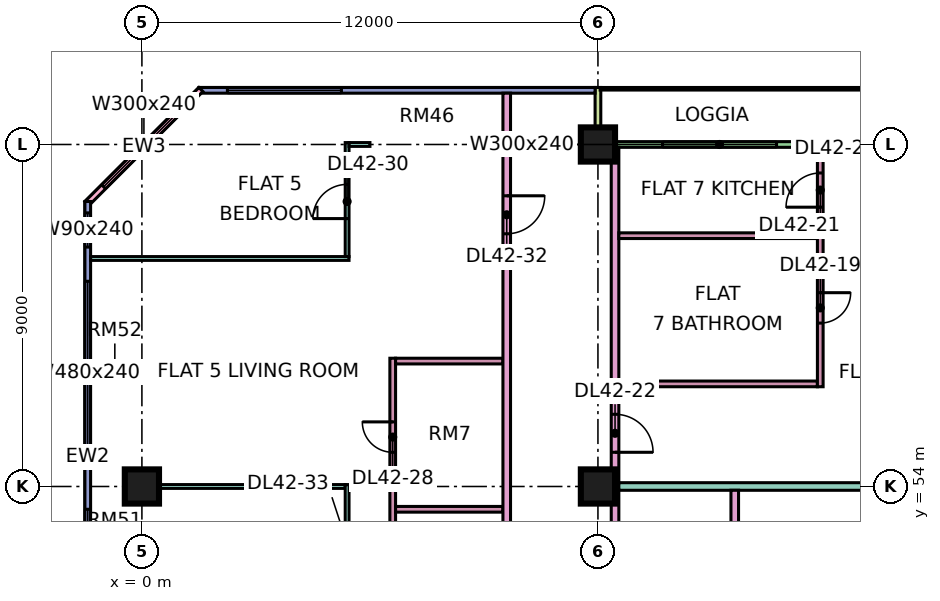
"""IFC4 building model, lengths in metres.
Left out: names, types, materials, properties, quantities, classifications, styles, units other than length and angle.
Written with IfcOpenShell. Run it as: python <this file> out.ifc"""

import sys

from ifc_helpers import new_model, si_unit, direction, frame, frame_2d, origin, origin_2d, place, context, subcontext, project, spatial, rectangle, extrude, element, fill, save


model = new_model("IFC4")
c1 = context("Model", 3, precision=1e-05, world=origin(), true_north=direction((0.0, 1.0)))
c2 = subcontext(c1, "Body", "Model", "MODEL_VIEW")
j1 = project(units=[si_unit("LENGTHUNIT", "METRE"), si_unit("PLANEANGLEUNIT", "RADIAN")], contexts=[c1])
p1 = place(None, origin())
s1 = spatial("IfcSite", under=j1, at=p1, CompositionType="ELEMENT")
p2 = place(p1, origin())
s2 = spatial("IfcBuilding", under=s1, at=p2, CompositionType="ELEMENT")
p3 = place(p2, frame((0.0, 0.0, 183.65)))
s3 = spatial("IfcBuildingStorey", under=s2, at=p3, CompositionType="ELEMENT", Elevation=183.65)
p4 = place(p3, frame((0.0, 54.0, 0.0), z_axis=(0.0, 0.0, 1.0), x_axis=(1.0, 0.0, 0.0)))
e1 = element("IfcColumn", 1, at=p4, inside=s3, PredefinedType="COLUMN", context=c2, shape_type="SweptSolid", body=[
    extrude(rectangle(XDim=0.9, YDim=0.9, at=origin_2d()), origin(), (0.0, 0.0, 1.0), 3.75),
])
for number, where, z_axis, x_axis in (
    (2, (12.0, 54.0, 0.0), (0.0, 0.0, 1.0), (1.0, 0.0, 0.0)),
    (3, (12.0, 63.0, 0.0), (0.0, 0.0, 1.0), (1.0, 0.0, 0.0)),
):
    element("IfcColumn", number, at=place(p3, frame(where, z_axis=z_axis, x_axis=x_axis)), inside=s3, PredefinedType="COLUMN", context=c2, shape_type="SweptSolid", body=[
        extrude(rectangle(XDim=0.9, YDim=0.9, at=origin_2d()), origin(), (0.0, 0.0, 1.0), 3.75),
    ])
p5 = place(p3, frame((22.425, 63.0, 0.0), z_axis=(0.0, 0.0, 1.0), x_axis=(-1.0, 0.0, 0.0)))
e4 = element("IfcWall", 4, at=p5, inside=s3, PredefinedType="SOLIDWALL", context=c2, shape_type="SweptSolid", body=[
    extrude(rectangle(XDim=10.35, YDim=0.15, at=frame_2d((5.175, 0.0))), origin(), (0.0, 0.0, 1.0), 3.35),
])
p6 = place(p5, frame((0.788, 0.0, 0.0)))
e5 = element("IfcOpeningElement", 5, at=p6, cuts=e4, PredefinedType="OPENING", context=c2, shape_type="SweptSolid", body=[
    extrude(rectangle(XDim=1.8, YDim=2.4, at=frame_2d((0.9, 1.2))), frame((0.0, 0.085, 0.0), z_axis=(0.0, -1.0, 0.0), x_axis=(1.0, 0.0, 0.0)), (0.0, 0.0, 1.0), 0.17),
])
p7 = place(p5, frame((5.725, 0.0, 0.45)))
e6 = element("IfcOpeningElement", 6, at=p7, cuts=e4, PredefinedType="OPENING", context=c2, shape_type="SweptSolid", body=[
    extrude(rectangle(XDim=3.0, YDim=2.4, at=frame_2d((1.5, 1.2))), frame((0.0, 0.085, 0.0), z_axis=(0.0, -1.0, 0.0), x_axis=(1.0, 0.0, 0.0)), (0.0, 0.0, 1.0), 0.17),
])
p8 = place(p3, frame((12.0, 64.5, 0.0), z_axis=(0.0, 0.0, 1.0), x_axis=(0.0, -1.0, 0.0)))
e7 = element("IfcWall", 7, at=p8, inside=s3, PredefinedType="SOLIDWALL", context=c2, shape_type="SweptSolid", body=[
    extrude(rectangle(XDim=1.5, YDim=0.15, at=frame_2d((0.75, 0.0))), origin(), (0.0, 0.0, 1.0), 3.35),
])
p9 = place(p3, frame((11.925, 64.425, 0.0), z_axis=(0.0, 0.0, 1.0), x_axis=(-1.0, 0.0, 0.0)))
e8 = element("IfcWall", 8, at=p9, inside=s3, PredefinedType="SOLIDWALL", context=c2, shape_type="SweptSolid", body=[
    extrude(rectangle(XDim=10.425, YDim=0.15, at=frame_2d((5.212, 0.0))), origin(), (0.0, 0.0, 1.0), 3.35),
])
p10 = place(p9, frame((6.675, 0.0, 0.45)))
e9 = element("IfcOpeningElement", 9, at=p10, cuts=e8, PredefinedType="OPENING", context=c2, shape_type="SweptSolid", body=[
    extrude(rectangle(XDim=3.0, YDim=2.4, at=frame_2d((1.5, 1.2))), frame((0.0, 0.085, 0.0), z_axis=(0.0, -1.0, 0.0), x_axis=(1.0, 0.0, 0.0)), (0.0, 0.0, 1.0), 0.17),
])
p11 = place(p3, frame((1.553, 64.447, 0.0), z_axis=(0.0, 0.0, 1.0), x_axis=(-0.707106781187, -0.707106781187, 0.0)))
e10 = element("IfcWall", 10, at=p11, inside=s3, PredefinedType="SOLIDWALL", context=c2, shape_type="SweptSolid", body=[
    extrude(rectangle(XDim=4.243, YDim=0.15, at=frame_2d((2.121, 0.0))), origin(), (0.0, 0.0, 1.0), 3.35),
])
p12 = place(p11, frame((0.621, 0.0, 0.45)))
e11 = element("IfcOpeningElement", 11, at=p12, cuts=e10, PredefinedType="OPENING", context=c2, shape_type="SweptSolid", body=[
    extrude(rectangle(XDim=3.0, YDim=2.4, at=frame_2d((1.5, 1.2))), frame((0.0, 0.085, 0.0), z_axis=(0.0, -1.0, 0.0), x_axis=(1.0, 0.0, 0.0)), (0.0, 0.0, 1.0), 0.17),
])
p13 = place(p3, frame((-1.425, 61.5, 0.0), z_axis=(0.0, 0.0, 1.0), x_axis=(0.0, -1.0, 0.0)))
e12 = element("IfcWall", 12, at=p13, inside=s3, PredefinedType="SOLIDWALL", context=c2, shape_type="SweptSolid", body=[
    extrude(rectangle(XDim=13.425, YDim=0.15, at=frame_2d((6.712, 0.0))), origin(), (0.0, 0.0, 1.0), 3.35),
])
p14 = place(p13, frame((0.3, 0.0, 0.45)))
e13 = element("IfcOpeningElement", 13, at=p14, cuts=e12, PredefinedType="OPENING", context=c2, shape_type="SweptSolid", body=[
    extrude(rectangle(XDim=0.9, YDim=2.4, at=frame_2d((0.45, 1.2))), frame((0.0, 0.085, 0.0), z_axis=(0.0, -1.0, 0.0), x_axis=(1.0, 0.0, 0.0)), (0.0, 0.0, 1.0), 0.17),
])
p15 = place(p13, frame((2.1, 0.0, 0.45)))
e14 = element("IfcOpeningElement", 14, at=p15, cuts=e12, PredefinedType="OPENING", context=c2, shape_type="SweptSolid", body=[
    extrude(rectangle(XDim=4.8, YDim=2.4, at=frame_2d((2.4, 1.2))), frame((0.0, 0.085, 0.0), z_axis=(0.0, -1.0, 0.0), x_axis=(1.0, 0.0, 0.0)), (0.0, 0.0, 1.0), 0.17),
])
p16 = place(p13, frame((8.1, 0.0, 0.45)))
e15 = element("IfcOpeningElement", 15, at=p16, cuts=e12, PredefinedType="OPENING", context=c2, shape_type="SweptSolid", body=[
    extrude(rectangle(XDim=1.8, YDim=2.4, at=frame_2d((0.9, 1.2))), frame((0.0, 0.085, 0.0), z_axis=(0.0, -1.0, 0.0), x_axis=(1.0, 0.0, 0.0)), (0.0, 0.0, 1.0), 0.17),
])
p17 = place(p13, frame((11.062, 0.0, 0.45)))
e16 = element("IfcOpeningElement", 16, at=p17, cuts=e12, PredefinedType="OPENING", context=c2, shape_type="SweptSolid", body=[
    extrude(rectangle(XDim=1.8, YDim=2.4, at=frame_2d((0.9, 1.2))), frame((0.0, 0.085, 0.0), z_axis=(0.0, -1.0, 0.0), x_axis=(1.0, 0.0, 0.0)), (0.0, 0.0, 1.0), 0.17),
])
e17 = element("IfcWall", 17, at=p4, inside=s3, PredefinedType="PARTITIONING", context=c2, shape_type="SweptSolid", body=[
    extrude(rectangle(XDim=5.35, YDim=0.1, at=frame_2d((2.675, 0.0))), origin(), (0.0, 0.0, 1.0), 3.35),
])
p18 = place(p3, frame((-1.35, 60.0, 0.0), z_axis=(0.0, 0.0, 1.0), x_axis=(1.0, 0.0, 0.0)))
e18 = element("IfcWall", 18, at=p18, inside=s3, PredefinedType="PARTITIONING", context=c2, shape_type="SweptSolid", body=[
    extrude(rectangle(XDim=6.8, YDim=0.1, at=frame_2d((3.4, 0.0))), origin(), (0.0, 0.0, 1.0), 3.35),
])
p19 = place(p3, frame((5.4, 48.1, 0.0), z_axis=(0.0, 0.0, 1.0), x_axis=(0.0, 1.0, 0.0)))
e19 = element("IfcWall", 19, at=p19, inside=s3, PredefinedType="PARTITIONING", context=c2, shape_type="SweptSolid", body=[
    extrude(rectangle(XDim=5.95, YDim=0.1, at=frame_2d((2.975, 0.0))), origin(), (0.0, 0.0, 1.0), 3.35),
])
p20 = place(p19, frame((0.95, 0.0, 0.0)))
e20 = element("IfcOpeningElement", 20, at=p20, cuts=e19, PredefinedType="OPENING", context=c2, shape_type="SweptSolid", body=[
    extrude(rectangle(XDim=0.9, YDim=2.1, at=frame_2d((0.45, 1.05))), frame((0.0, 0.06, 0.0), z_axis=(0.0, -1.0, 0.0), x_axis=(1.0, 0.0, 0.0)), (0.0, 0.0, 1.0), 0.12),
])
p21 = place(p19, frame((3.95, 0.0, 0.0)))
e21 = element("IfcOpeningElement", 21, at=p21, cuts=e19, PredefinedType="OPENING", context=c2, shape_type="SweptSolid", body=[
    extrude(rectangle(XDim=0.9, YDim=2.1, at=frame_2d((0.45, 1.05))), frame((0.0, 0.06, 0.0), z_axis=(0.0, -1.0, 0.0), x_axis=(1.0, 0.0, 0.0)), (0.0, 0.0, 1.0), 0.12),
])
p22 = place(p3, frame((5.4, 60.05, 0.0), z_axis=(0.0, 0.0, 1.0), x_axis=(0.0, 1.0, 0.0)))
e22 = element("IfcWall", 22, at=p22, inside=s3, PredefinedType="PARTITIONING", context=c2, shape_type="SweptSolid", body=[
    extrude(rectangle(XDim=3.0, YDim=0.1, at=frame_2d((1.5, 0.0))), origin(), (0.0, 0.0, 1.0), 3.35),
])
p23 = place(p22, frame((1.0, 0.0, 0.0)))
e23 = element("IfcOpeningElement", 23, at=p23, cuts=e22, PredefinedType="OPENING", context=c2, shape_type="SweptSolid", body=[
    extrude(rectangle(XDim=0.9, YDim=2.1, at=frame_2d((0.45, 1.05))), frame((0.0, 0.06, 0.0), z_axis=(0.0, -1.0, 0.0), x_axis=(1.0, 0.0, 0.0)), (0.0, 0.0, 1.0), 0.12),
])
p24 = place(p3, frame((5.45, 63.0, 0.0), z_axis=(0.0, 0.0, 1.0), x_axis=(1.0, 0.0, 0.0)))
e24 = element("IfcWall", 24, at=p24, inside=s3, PredefinedType="PARTITIONING", context=c2, shape_type="SweptSolid", body=[
    extrude(rectangle(XDim=0.55, YDim=0.1, at=frame_2d((0.275, 0.0))), origin(), (0.0, 0.0, 1.0), 3.35),
])
p25 = place(p3, frame((6.6, 48.1, 0.0), z_axis=(0.0, 0.0, 1.0), x_axis=(0.0, 1.0, 0.0)))
e25 = element("IfcWall", 25, at=p25, inside=s3, PredefinedType="PARTITIONING", context=c2, shape_type="SweptSolid", body=[
    extrude(rectangle(XDim=9.275, YDim=0.15, at=frame_2d((4.637, 0.0))), origin(), (0.0, 0.0, 1.0), 3.35),
])
p26 = place(p25, frame((6.8, 0.0, 0.0)))
e26 = element("IfcOpeningElement", 26, at=p26, cuts=e25, PredefinedType="OPENING", context=c2, shape_type="SweptSolid", body=[
    extrude(rectangle(XDim=0.8, YDim=2.1, at=frame_2d((0.4, 1.05))), frame((0.0, 0.085, 0.0), z_axis=(0.0, -1.0, 0.0), x_axis=(1.0, 0.0, 0.0)), (0.0, 0.0, 1.0), 0.17),
])
p27 = place(p25, frame((2.15, 0.0, 0.0)))
e27 = element("IfcOpeningElement", 27, at=p27, cuts=e25, PredefinedType="OPENING", context=c2, shape_type="SweptSolid", body=[
    extrude(rectangle(XDim=0.9, YDim=2.1, at=frame_2d((0.45, 1.05))), frame((0.0, 0.085, 0.0), z_axis=(0.0, -1.0, 0.0), x_axis=(1.0, 0.0, 0.0)), (0.0, 0.0, 1.0), 0.17),
])
for number, where, z_axis, x_axis in (
    (28, (6.675, 53.4, 0.0), (0.0, 0.0, 1.0), (1.0, 0.0, 0.0)),
    (29, (6.675, 57.3, 0.0), (0.0, 0.0, 1.0), (1.0, 0.0, 0.0)),
):
    element("IfcWall", number, at=place(p3, frame(where, z_axis=z_axis, x_axis=x_axis)), inside=s3, PredefinedType="PARTITIONING", context=c2, shape_type="SweptSolid", body=[
        extrude(rectangle(XDim=2.825, YDim=0.15, at=frame_2d((1.413, 0.0))), origin(), (0.0, 0.0, 1.0), 3.35),
    ])
p28 = place(p3, frame((9.6, 20.0, 0.0), z_axis=(0.0, 0.0, 1.0), x_axis=(0.0, 1.0, 0.0)))
e30 = element("IfcWall", 30, at=p28, inside=s3, PredefinedType="PARTITIONING", context=c2, shape_type="SweptSolid", body=[
    extrude(rectangle(XDim=44.35, YDim=0.2, at=frame_2d((22.175, 0.0))), origin(), (0.0, 0.0, 1.0), 3.35),
])
p29 = place(p28, frame((16.8, 0.0, 0.0)))
e31 = element("IfcOpeningElement", 31, at=p29, cuts=e30, PredefinedType="OPENING", context=c2, shape_type="SweptSolid", body=[
    extrude(rectangle(XDim=1.0, YDim=2.1, at=frame_2d((0.5, 1.05))), frame((0.0, 0.11, 0.0), z_axis=(0.0, -1.0, 0.0), x_axis=(1.0, 0.0, 0.0)), (0.0, 0.0, 1.0), 0.22),
])
p30 = place(p28, frame((40.65, 0.0, 0.0)))
e32 = element("IfcOpeningElement", 32, at=p30, cuts=e30, PredefinedType="OPENING", context=c2, shape_type="SweptSolid", body=[
    extrude(rectangle(XDim=1.0, YDim=2.1, at=frame_2d((0.5, 1.05))), frame((0.0, 0.11, 0.0), z_axis=(0.0, -1.0, 0.0), x_axis=(1.0, 0.0, 0.0)), (0.0, 0.0, 1.0), 0.22),
])
p31 = place(p28, frame((0.6, 0.0, 0.0)))
e33 = element("IfcOpeningElement", 33, at=p31, cuts=e30, PredefinedType="OPENING", context=c2, shape_type="SweptSolid", body=[
    extrude(rectangle(XDim=1.2, YDim=2.1, at=frame_2d((0.6, 1.05))), frame((0.0, 0.11, 0.0), z_axis=(0.0, -1.0, 0.0), x_axis=(1.0, 0.0, 0.0)), (0.0, 0.0, 1.0), 0.22),
])
p32 = place(p28, frame((4.2, 0.0, 0.0)))
e34 = element("IfcOpeningElement", 34, at=p32, cuts=e30, PredefinedType="OPENING", context=c2, shape_type="SweptSolid", body=[
    extrude(rectangle(XDim=1.0, YDim=2.1, at=frame_2d((0.5, 1.05))), frame((0.0, 0.11, 0.0), z_axis=(0.0, -1.0, 0.0), x_axis=(1.0, 0.0, 0.0)), (0.0, 0.0, 1.0), 0.22),
])
p33 = place(p3, frame((12.45, 20.0, 0.0), z_axis=(0.0, 0.0, 1.0), x_axis=(0.0, 1.0, 0.0)))
e35 = element("IfcWall", 35, at=p33, inside=s3, PredefinedType="PARTITIONING", context=c2, shape_type="SweptSolid", body=[
    extrude(rectangle(XDim=42.926, YDim=0.2, at=frame_2d((21.463, 0.0))), origin(), (0.0, 0.0, 1.0), 3.35),
])
p34 = place(p33, frame((5.95, 0.0, 0.0)))
e36 = element("IfcOpeningElement", 36, at=p34, cuts=e35, PredefinedType="OPENING", context=c2, shape_type="SweptSolid", body=[
    extrude(rectangle(XDim=1.0, YDim=2.1, at=frame_2d((0.5, 1.05))), frame((0.0, 0.11, 0.0), z_axis=(0.0, -1.0, 0.0), x_axis=(1.0, 0.0, 0.0)), (0.0, 0.0, 1.0), 0.22),
])
p35 = place(p33, frame((12.0, 0.0, 0.0)))
e37 = element("IfcOpeningElement", 37, at=p35, cuts=e35, PredefinedType="OPENING", context=c2, shape_type="SweptSolid", body=[
    extrude(rectangle(XDim=1.0, YDim=2.1, at=frame_2d((0.5, 1.05))), frame((0.0, 0.11, 0.0), z_axis=(0.0, -1.0, 0.0), x_axis=(1.0, 0.0, 0.0)), (0.0, 0.0, 1.0), 0.22),
])
p36 = place(p33, frame((16.9, 0.0, 0.0)))
e38 = element("IfcOpeningElement", 38, at=p36, cuts=e35, PredefinedType="OPENING", context=c2, shape_type="SweptSolid", body=[
    extrude(rectangle(XDim=1.0, YDim=2.1, at=frame_2d((0.5, 1.05))), frame((0.0, 0.11, 0.0), z_axis=(0.0, -1.0, 0.0), x_axis=(1.0, 0.0, 0.0)), (0.0, 0.0, 1.0), 0.22),
])
p37 = place(p33, frame((34.9, 0.0, 0.0)))
e39 = element("IfcOpeningElement", 39, at=p37, cuts=e35, PredefinedType="OPENING", context=c2, shape_type="SweptSolid", body=[
    extrude(rectangle(XDim=1.0, YDim=2.1, at=frame_2d((0.5, 1.05))), frame((0.0, 0.11, 0.0), z_axis=(0.0, -1.0, 0.0), x_axis=(1.0, 0.0, 0.0)), (0.0, 0.0, 1.0), 0.22),
])
p38 = place(p33, frame((1.15, 0.0, 0.0)))
e40 = element("IfcOpeningElement", 40, at=p38, cuts=e35, PredefinedType="OPENING", context=c2, shape_type="SweptSolid", body=[
    extrude(rectangle(XDim=1.8, YDim=2.1, at=frame_2d((0.9, 1.05))), frame((0.0, 0.11, 0.0), z_axis=(0.0, -1.0, 0.0), x_axis=(1.0, 0.0, 0.0)), (0.0, 0.0, 1.0), 0.22),
])
p39 = place(p33, frame((28.6, 0.0, 0.0)))
e41 = element("IfcOpeningElement", 41, at=p39, cuts=e35, PredefinedType="OPENING", context=c2, shape_type="SweptSolid", body=[
    extrude(rectangle(XDim=1.8, YDim=2.1, at=frame_2d((0.9, 1.05))), frame((0.0, 0.11, 0.0), z_axis=(0.0, -1.0, 0.0), x_axis=(1.0, 0.0, 0.0)), (0.0, 0.0, 1.0), 0.22),
])
p40 = place(p3, frame((12.55, 54.0, 0.0), z_axis=(0.0, 0.0, 1.0), x_axis=(1.0, 0.0, 0.0)))
e42 = element("IfcWall", 42, at=p40, inside=s3, PredefinedType="PARTITIONING", context=c2, shape_type="SweptSolid", body=[
    extrude(rectangle(XDim=11.45, YDim=0.2, at=frame_2d((5.725, 0.0))), origin(), (0.0, 0.0, 1.0), 3.35),
])
for number, where, z_axis, x_axis in (
    (43, (12.55, 56.7, 0.0), (0.0, 0.0, 1.0), (1.0, 0.0, 0.0)),
    (44, (12.55, 60.6, 0.0), (0.0, 0.0, 1.0), (1.0, 0.0, 0.0)),
):
    element("IfcWall", number, at=place(p3, frame(where, z_axis=z_axis, x_axis=x_axis)), inside=s3, PredefinedType="PARTITIONING", context=c2, shape_type="SweptSolid", body=[
        extrude(rectangle(XDim=5.225, YDim=0.15, at=frame_2d((2.612, 0.0))), origin(), (0.0, 0.0, 1.0), 3.35),
    ])
p41 = place(p3, frame((15.6, 51.225, 0.0), z_axis=(0.0, 0.0, 1.0), x_axis=(0.0, 1.0, 0.0)))
e45 = element("IfcWall", 45, at=p41, inside=s3, PredefinedType="PARTITIONING", context=c2, shape_type="SweptSolid", body=[
    extrude(rectangle(XDim=2.675, YDim=0.2, at=frame_2d((1.337, 0.0))), origin(), (0.0, 0.0, 1.0), 3.35),
])
p42 = place(p3, frame((17.85, 56.625, 0.0), z_axis=(0.0, 0.0, 1.0), x_axis=(0.0, 1.0, 0.0)))
e46 = element("IfcWall", 46, at=p42, inside=s3, PredefinedType="PARTITIONING", context=c2, shape_type="SweptSolid", body=[
    extrude(rectangle(XDim=6.301, YDim=0.15, at=frame_2d((3.15, 0.0))), origin(), (0.0, 0.0, 1.0), 3.35),
])
p43 = place(p42, frame((1.675, 0.0, 0.0)))
e47 = element("IfcOpeningElement", 47, at=p43, cuts=e46, PredefinedType="OPENING", context=c2, shape_type="SweptSolid", body=[
    extrude(rectangle(XDim=0.8, YDim=2.1, at=frame_2d((0.4, 1.05))), frame((0.0, 0.085, 0.0), z_axis=(0.0, -1.0, 0.0), x_axis=(1.0, 0.0, 0.0)), (0.0, 0.0, 1.0), 0.17),
])
p44 = place(p42, frame((4.725, 0.0, 0.0)))
e48 = element("IfcOpeningElement", 48, at=p44, cuts=e46, PredefinedType="OPENING", context=c2, shape_type="SweptSolid", body=[
    extrude(rectangle(XDim=0.9, YDim=2.1, at=frame_2d((0.45, 1.05))), frame((0.0, 0.085, 0.0), z_axis=(0.0, -1.0, 0.0), x_axis=(1.0, 0.0, 0.0)), (0.0, 0.0, 1.0), 0.17),
])
p45 = place(p7, origin())
e49 = element("IfcWindow", 49, at=p45, inside=s3, PartitioningType="SINGLE_PANEL", PredefinedType="WINDOW", context=c2, shape_type="SweptSolid", body=[
    extrude(rectangle(XDim=3.0, YDim=2.4, at=frame_2d((1.5, 1.2))), frame((0.0, 0.03, 0.0), z_axis=(0.0, -1.0, 0.0), x_axis=(1.0, 0.0, 0.0)), (0.0, 0.0, 1.0), 0.06),
])
fill(e6, e49)
p46 = place(p10, origin())
e50 = element("IfcWindow", 50, at=p46, inside=s3, PartitioningType="SINGLE_PANEL", PredefinedType="WINDOW", context=c2, shape_type="SweptSolid", body=[
    extrude(rectangle(XDim=3.0, YDim=2.4, at=frame_2d((1.5, 1.2))), frame((0.0, 0.03, 0.0), z_axis=(0.0, -1.0, 0.0), x_axis=(1.0, 0.0, 0.0)), (0.0, 0.0, 1.0), 0.06),
])
fill(e9, e50)
p47 = place(p12, origin())
e51 = element("IfcWindow", 51, at=p47, inside=s3, PartitioningType="SINGLE_PANEL", PredefinedType="WINDOW", context=c2, shape_type="SweptSolid", body=[
    extrude(rectangle(XDim=3.0, YDim=2.4, at=frame_2d((1.5, 1.2))), frame((0.0, 0.03, 0.0), z_axis=(0.0, -1.0, 0.0), x_axis=(1.0, 0.0, 0.0)), (0.0, 0.0, 1.0), 0.06),
])
fill(e11, e51)
p48 = place(p14, origin())
e52 = element("IfcWindow", 52, at=p48, inside=s3, PartitioningType="SINGLE_PANEL", PredefinedType="WINDOW", context=c2, shape_type="SweptSolid", body=[
    extrude(rectangle(XDim=0.9, YDim=2.4, at=frame_2d((0.45, 1.2))), frame((0.0, 0.03, 0.0), z_axis=(0.0, -1.0, 0.0), x_axis=(1.0, 0.0, 0.0)), (0.0, 0.0, 1.0), 0.06),
])
fill(e13, e52)
p49 = place(p15, origin())
e53 = element("IfcWindow", 53, at=p49, inside=s3, PartitioningType="SINGLE_PANEL", PredefinedType="WINDOW", context=c2, shape_type="SweptSolid", body=[
    extrude(rectangle(XDim=4.8, YDim=2.4, at=frame_2d((2.4, 1.2))), frame((0.0, 0.03, 0.0), z_axis=(0.0, -1.0, 0.0), x_axis=(1.0, 0.0, 0.0)), (0.0, 0.0, 1.0), 0.06),
])
fill(e14, e53)
p50 = place(p16, origin())
e54 = element("IfcWindow", 54, at=p50, inside=s3, PartitioningType="SINGLE_PANEL", PredefinedType="WINDOW", context=c2, shape_type="SweptSolid", body=[
    extrude(rectangle(XDim=1.8, YDim=2.4, at=frame_2d((0.9, 1.2))), frame((0.0, 0.03, 0.0), z_axis=(0.0, -1.0, 0.0), x_axis=(1.0, 0.0, 0.0)), (0.0, 0.0, 1.0), 0.06),
])
fill(e15, e54)
p51 = place(p43, origin())
e55 = element("IfcDoor", 55, at=p51, inside=s3, OperationType="SINGLE_SWING_RIGHT", PredefinedType="DOOR", context=c2, shape_type="SweptSolid", body=[
    extrude(rectangle(XDim=0.8, YDim=2.1, at=frame_2d((0.4, 1.05))), frame((0.0, 0.025, 0.0), z_axis=(0.0, -1.0, 0.0), x_axis=(1.0, 0.0, 0.0)), (0.0, 0.0, 1.0), 0.05),
])
fill(e47, e55)
p52 = place(p44, origin())
e56 = element("IfcDoor", 56, at=p52, inside=s3, OperationType="SINGLE_SWING_LEFT", PredefinedType="DOOR", context=c2, shape_type="SweptSolid", body=[
    extrude(rectangle(XDim=0.9, YDim=2.1, at=frame_2d((0.45, 1.05))), frame((0.0, 0.025, 0.0), z_axis=(0.0, -1.0, 0.0), x_axis=(1.0, 0.0, 0.0)), (0.0, 0.0, 1.0), 0.05),
])
fill(e48, e56)
p53 = place(p37, frame((1.0, 0.0, 0.0), z_axis=(0.0, 0.0, 1.0), x_axis=(-1.0, 0.0, 0.0)))
e57 = element("IfcDoor", 57, at=p53, inside=s3, OperationType="SINGLE_SWING_LEFT", PredefinedType="DOOR", context=c2, shape_type="SweptSolid", body=[
    extrude(rectangle(XDim=1.0, YDim=2.1, at=frame_2d((0.5, 1.05))), frame((0.0, 0.025, 0.0), z_axis=(0.0, -1.0, 0.0), x_axis=(1.0, 0.0, 0.0)), (0.0, 0.0, 1.0), 0.05),
])
fill(e39, e57)
p54 = place(p26, frame((0.8, 0.0, 0.0), z_axis=(0.0, 0.0, 1.0), x_axis=(-1.0, 0.0, 0.0)))
e58 = element("IfcDoor", 58, at=p54, inside=s3, OperationType="SINGLE_SWING_RIGHT", PredefinedType="DOOR", context=c2, shape_type="SweptSolid", body=[
    extrude(rectangle(XDim=0.8, YDim=2.1, at=frame_2d((0.4, 1.05))), frame((0.0, 0.025, 0.0), z_axis=(0.0, -1.0, 0.0), x_axis=(1.0, 0.0, 0.0)), (0.0, 0.0, 1.0), 0.05),
])
fill(e26, e58)
p55 = place(p23, origin())
e59 = element("IfcDoor", 59, at=p55, inside=s3, OperationType="SINGLE_SWING_LEFT", PredefinedType="DOOR", context=c2, shape_type="SweptSolid", body=[
    extrude(rectangle(XDim=0.9, YDim=2.1, at=frame_2d((0.45, 1.05))), frame((0.0, 0.025, 0.0), z_axis=(0.0, -1.0, 0.0), x_axis=(1.0, 0.0, 0.0)), (0.0, 0.0, 1.0), 0.05),
])
fill(e23, e59)
p56 = place(p30, origin())
e60 = element("IfcDoor", 60, at=p56, inside=s3, OperationType="SINGLE_SWING_RIGHT", PredefinedType="DOOR", context=c2, shape_type="SweptSolid", body=[
    extrude(rectangle(XDim=1.0, YDim=2.1, at=frame_2d((0.5, 1.05))), frame((0.0, 0.025, 0.0), z_axis=(0.0, -1.0, 0.0), x_axis=(1.0, 0.0, 0.0)), (0.0, 0.0, 1.0), 0.05),
])
fill(e32, e60)
save(model, sys.argv[1])
